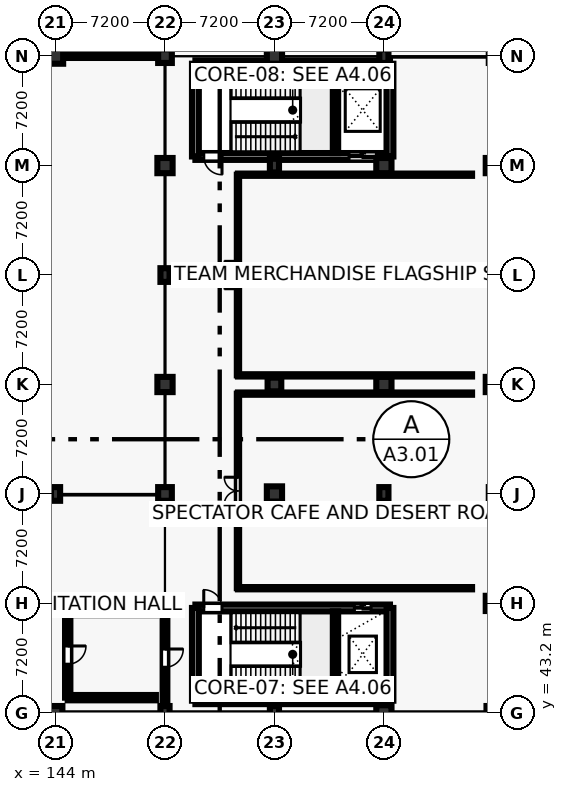
"""IFC4 building model, lengths in metres.
Left out: names, types, materials, properties, quantities, classifications, styles, units other than length and angle.
Written with IfcOpenShell. Run it as: python <this file> out.ifc"""

import sys

from ifc_helpers import new_model, si_unit, direction, frame, frame_2d, origin, origin_2d, place, context, subcontext, project, spatial, rectangle, circle, extrude, element, fill, save


model = new_model("IFC4")
c1 = context("Model", 3, precision=1e-05, world=origin(), true_north=direction((0.0, 1.0)))
c2 = subcontext(c1, "Body", "Model", "MODEL_VIEW")
j1 = project(units=[si_unit("LENGTHUNIT", "METRE"), si_unit("PLANEANGLEUNIT", "RADIAN")], contexts=[c1])
p1 = place(None, origin())
s1 = spatial("IfcSite", under=j1, at=p1, CompositionType="ELEMENT")
p2 = place(p1, origin())
s2 = spatial("IfcBuilding", under=s1, at=p2, CompositionType="ELEMENT")
p3 = place(p2, origin())
s3 = spatial("IfcBuildingStorey", under=s2, at=p3, CompositionType="ELEMENT", Elevation=0.0)
p4 = place(p3, frame((144.0, 43.2, 0.0), z_axis=(0.0, 0.0, 1.0), x_axis=(1.0, 0.0, 0.0)))
e1 = element("IfcColumn", 1, at=p4, inside=s3, PredefinedType="COLUMN", context=c2, shape_type="SweptSolid", body=[
    extrude(rectangle(XDim=0.9, YDim=0.9, at=origin_2d()), origin(), (0.0, 0.0, 1.0), 5.4),
])
p5 = place(p3, frame((144.0, 50.4, 0.0), z_axis=(0.0, 0.0, 1.0), x_axis=(1.0, 0.0, 0.0)))
e2 = element("IfcColumn", 2, at=p5, inside=s3, PredefinedType="COLUMN", context=c2, shape_type="SweptSolid", body=[
    extrude(circle(Radius=0.5, at=origin_2d()), origin(), (0.0, 0.0, 1.0), 5.4),
])
p6 = place(p3, frame((144.0, 57.6, 0.0), z_axis=(0.0, 0.0, 1.0), x_axis=(1.0, 0.0, 0.0)))
e3 = element("IfcColumn", 3, at=p6, inside=s3, PredefinedType="COLUMN", context=c2, shape_type="SweptSolid", body=[
    extrude(rectangle(XDim=0.6, YDim=0.9, at=origin_2d()), origin(), (0.0, 0.0, 1.0), 5.4),
])
p7 = place(p3, frame((144.0, 86.4, 0.0), z_axis=(0.0, 0.0, 1.0), x_axis=(1.0, 0.0, 0.0)))
e4 = element("IfcColumn", 4, at=p7, inside=s3, PredefinedType="COLUMN", context=c2, shape_type="SweptSolid", body=[
    extrude(rectangle(XDim=1.0, YDim=1.0, at=origin_2d()), origin(), (0.0, 0.0, 1.0), 5.4),
])
p8 = place(p3, frame((151.2, 43.2, 0.0), z_axis=(0.0, 0.0, 1.0), x_axis=(1.0, 0.0, 0.0)))
e5 = element("IfcColumn", 5, at=p8, inside=s3, PredefinedType="COLUMN", context=c2, shape_type="SweptSolid", body=[
    extrude(rectangle(XDim=0.6, YDim=0.9, at=origin_2d()), origin(), (0.0, 0.0, 1.0), 5.4),
])
p9 = place(p3, frame((151.2, 50.4, 0.0), z_axis=(0.0, 0.0, 1.0), x_axis=(1.0, 0.0, 0.0)))
e6 = element("IfcColumn", 6, at=p9, inside=s3, PredefinedType="COLUMN", context=c2, shape_type="SweptSolid", body=[
    extrude(rectangle(XDim=1.0, YDim=1.0, at=origin_2d()), origin(), (0.0, 0.0, 1.0), 5.4),
])
p10 = place(p3, frame((151.2, 57.6, 0.0), z_axis=(0.0, 0.0, 1.0), x_axis=(1.0, 0.0, 0.0)))
e7 = element("IfcColumn", 7, at=p10, inside=s3, PredefinedType="COLUMN", context=c2, shape_type="SweptSolid", body=[
    extrude(rectangle(XDim=0.9, YDim=0.9, at=origin_2d()), origin(), (0.0, 0.0, 1.0), 5.4),
])
p11 = place(p3, frame((151.2, 64.8, 0.0), z_axis=(0.0, 0.0, 1.0), x_axis=(1.0, 0.0, 0.0)))
e8 = element("IfcColumn", 8, at=p11, inside=s3, PredefinedType="COLUMN", context=c2, shape_type="SweptSolid", body=[
    extrude(circle(Radius=0.5, at=origin_2d()), origin(), (0.0, 0.0, 1.0), 5.4),
])
p12 = place(p3, frame((151.2, 72.0, 0.0), z_axis=(0.0, 0.0, 1.0), x_axis=(1.0, 0.0, 0.0)))
e9 = element("IfcColumn", 9, at=p12, inside=s3, PredefinedType="COLUMN", context=c2, shape_type="SweptSolid", body=[
    extrude(rectangle(XDim=0.6, YDim=0.9, at=origin_2d()), origin(), (0.0, 0.0, 1.0), 5.4),
])
p13 = place(p3, frame((151.2, 79.2, 0.0), z_axis=(0.0, 0.0, 1.0), x_axis=(1.0, 0.0, 0.0)))
e10 = element("IfcColumn", 10, at=p13, inside=s3, PredefinedType="COLUMN", context=c2, shape_type="SweptSolid", body=[
    extrude(rectangle(XDim=1.0, YDim=1.0, at=origin_2d()), origin(), (0.0, 0.0, 1.0), 5.4),
])
p14 = place(p3, frame((151.2, 86.4, 0.0), z_axis=(0.0, 0.0, 1.0), x_axis=(1.0, 0.0, 0.0)))
e11 = element("IfcColumn", 11, at=p14, inside=s3, PredefinedType="COLUMN", context=c2, shape_type="SweptSolid", body=[
    extrude(rectangle(XDim=0.9, YDim=0.9, at=origin_2d()), origin(), (0.0, 0.0, 1.0), 5.4),
])
p15 = place(p3, frame((158.4, 43.2, 0.0), z_axis=(0.0, 0.0, 1.0), x_axis=(1.0, 0.0, 0.0)))
e12 = element("IfcColumn", 12, at=p15, inside=s3, PredefinedType="COLUMN", context=c2, shape_type="SweptSolid", body=[
    extrude(rectangle(XDim=0.6, YDim=0.9, at=origin_2d()), origin(), (0.0, 0.0, 1.0), 5.4),
])
p16 = place(p3, frame((158.4, 57.6, 0.0), z_axis=(0.0, 0.0, 1.0), x_axis=(1.0, 0.0, 0.0)))
e13 = element("IfcColumn", 13, at=p16, inside=s3, PredefinedType="COLUMN", context=c2, shape_type="SweptSolid", body=[
    extrude(rectangle(XDim=1.0, YDim=1.0, at=origin_2d()), origin(), (0.0, 0.0, 1.0), 5.4),
])
p17 = place(p3, frame((158.4, 64.8, 0.0), z_axis=(0.0, 0.0, 1.0), x_axis=(1.0, 0.0, 0.0)))
e14 = element("IfcColumn", 14, at=p17, inside=s3, PredefinedType="COLUMN", context=c2, shape_type="SweptSolid", body=[
    extrude(rectangle(XDim=0.9, YDim=0.9, at=origin_2d()), origin(), (0.0, 0.0, 1.0), 5.4),
])
p18 = place(p3, frame((158.4, 72.0, 0.0), z_axis=(0.0, 0.0, 1.0), x_axis=(1.0, 0.0, 0.0)))
e15 = element("IfcColumn", 15, at=p18, inside=s3, PredefinedType="COLUMN", context=c2, shape_type="SweptSolid", body=[
    extrude(circle(Radius=0.5, at=origin_2d()), origin(), (0.0, 0.0, 1.0), 5.4),
])
p19 = place(p3, frame((158.4, 79.2, 0.0), z_axis=(0.0, 0.0, 1.0), x_axis=(1.0, 0.0, 0.0)))
e16 = element("IfcColumn", 16, at=p19, inside=s3, PredefinedType="COLUMN", context=c2, shape_type="SweptSolid", body=[
    extrude(rectangle(XDim=0.6, YDim=0.9, at=origin_2d()), origin(), (0.0, 0.0, 1.0), 5.4),
])
p20 = place(p3, frame((158.4, 86.4, 0.0), z_axis=(0.0, 0.0, 1.0), x_axis=(1.0, 0.0, 0.0)))
e17 = element("IfcColumn", 17, at=p20, inside=s3, PredefinedType="COLUMN", context=c2, shape_type="SweptSolid", body=[
    extrude(rectangle(XDim=1.0, YDim=1.0, at=origin_2d()), origin(), (0.0, 0.0, 1.0), 5.4),
])
p21 = place(p3, frame((165.6, 43.2, 0.0), z_axis=(0.0, 0.0, 1.0), x_axis=(1.0, 0.0, 0.0)))
e18 = element("IfcColumn", 18, at=p21, inside=s3, PredefinedType="COLUMN", context=c2, shape_type="SweptSolid", body=[
    extrude(circle(Radius=0.5, at=origin_2d()), origin(), (0.0, 0.0, 1.0), 5.4),
])
p22 = place(p3, frame((165.6, 57.6, 0.0), z_axis=(0.0, 0.0, 1.0), x_axis=(1.0, 0.0, 0.0)))
e19 = element("IfcColumn", 19, at=p22, inside=s3, PredefinedType="COLUMN", context=c2, shape_type="SweptSolid", body=[
    extrude(rectangle(XDim=0.6, YDim=0.9, at=origin_2d()), origin(), (0.0, 0.0, 1.0), 5.4),
])
p23 = place(p3, frame((165.6, 64.8, 0.0), z_axis=(0.0, 0.0, 1.0), x_axis=(1.0, 0.0, 0.0)))
e20 = element("IfcColumn", 20, at=p23, inside=s3, PredefinedType="COLUMN", context=c2, shape_type="SweptSolid", body=[
    extrude(rectangle(XDim=1.0, YDim=1.0, at=origin_2d()), origin(), (0.0, 0.0, 1.0), 5.4),
])
p24 = place(p3, frame((165.6, 72.0, 0.0), z_axis=(0.0, 0.0, 1.0), x_axis=(1.0, 0.0, 0.0)))
e21 = element("IfcColumn", 21, at=p24, inside=s3, PredefinedType="COLUMN", context=c2, shape_type="SweptSolid", body=[
    extrude(rectangle(XDim=0.9, YDim=0.9, at=origin_2d()), origin(), (0.0, 0.0, 1.0), 5.4),
])
p25 = place(p3, frame((165.6, 79.2, 0.0), z_axis=(0.0, 0.0, 1.0), x_axis=(1.0, 0.0, 0.0)))
e22 = element("IfcColumn", 22, at=p25, inside=s3, PredefinedType="COLUMN", context=c2, shape_type="SweptSolid", body=[
    extrude(circle(Radius=0.5, at=origin_2d()), origin(), (0.0, 0.0, 1.0), 5.4),
])
p26 = place(p3, frame((165.6, 86.4, 0.0), z_axis=(0.0, 0.0, 1.0), x_axis=(1.0, 0.0, 0.0)))
e23 = element("IfcColumn", 23, at=p26, inside=s3, PredefinedType="COLUMN", context=c2, shape_type="SweptSolid", body=[
    extrude(rectangle(XDim=0.6, YDim=0.9, at=origin_2d()), origin(), (0.0, 0.0, 1.0), 5.4),
])
p27 = place(p3, frame((172.8, 43.2, 0.0), z_axis=(0.0, 0.0, 1.0), x_axis=(1.0, 0.0, 0.0)))
e24 = element("IfcColumn", 24, at=p27, inside=s3, PredefinedType="COLUMN", context=c2, shape_type="SweptSolid", body=[
    extrude(rectangle(XDim=0.9, YDim=0.9, at=origin_2d()), origin(), (0.0, 0.0, 1.0), 5.4),
])
p28 = place(p3, frame((172.8, 50.4, 0.0), z_axis=(0.0, 0.0, 1.0), x_axis=(1.0, 0.0, 0.0)))
e25 = element("IfcColumn", 25, at=p28, inside=s3, PredefinedType="COLUMN", context=c2, shape_type="SweptSolid", body=[
    extrude(circle(Radius=0.5, at=origin_2d()), origin(), (0.0, 0.0, 1.0), 5.4),
])
p29 = place(p3, frame((172.8, 64.8, 0.0), z_axis=(0.0, 0.0, 1.0), x_axis=(1.0, 0.0, 0.0)))
e26 = element("IfcColumn", 26, at=p29, inside=s3, PredefinedType="COLUMN", context=c2, shape_type="SweptSolid", body=[
    extrude(rectangle(XDim=1.0, YDim=1.0, at=origin_2d()), origin(), (0.0, 0.0, 1.0), 5.4),
])
p30 = place(p3, frame((172.8, 72.0, 0.0), z_axis=(0.0, 0.0, 1.0), x_axis=(1.0, 0.0, 0.0)))
e27 = element("IfcColumn", 27, at=p30, inside=s3, PredefinedType="COLUMN", context=c2, shape_type="SweptSolid", body=[
    extrude(rectangle(XDim=0.9, YDim=0.9, at=origin_2d()), origin(), (0.0, 0.0, 1.0), 5.4),
])
p31 = place(p3, frame((172.8, 79.2, 0.0), z_axis=(0.0, 0.0, 1.0), x_axis=(1.0, 0.0, 0.0)))
e28 = element("IfcColumn", 28, at=p31, inside=s3, PredefinedType="COLUMN", context=c2, shape_type="SweptSolid", body=[
    extrude(circle(Radius=0.5, at=origin_2d()), origin(), (0.0, 0.0, 1.0), 5.4),
])
p32 = place(p3, frame((153.2, 44.0, 0.0), z_axis=(0.0, 0.0, 1.0), x_axis=(1.0, 0.0, 0.0)))
e29 = element("IfcWall", 29, at=p32, inside=s3, PredefinedType="SHEAR", context=c2, shape_type="SweptSolid", body=[
    extrude(rectangle(XDim=12.8, YDim=0.45, at=frame_2d((6.4, 0.0))), origin(), (0.0, 0.0, 1.0), 5.06),
])
p33 = place(p3, frame((153.2, 50.1, 0.0), z_axis=(0.0, 0.0, 1.0), x_axis=(1.0, 0.0, 0.0)))
e30 = element("IfcWall", 30, at=p33, inside=s3, PredefinedType="SHEAR", context=c2, shape_type="SweptSolid", body=[
    extrude(rectangle(XDim=12.8, YDim=0.45, at=frame_2d((6.4, 0.0))), origin(), (0.0, 0.0, 1.0), 5.06),
])
p34 = place(p33, frame((0.55, 0.0, 0.0)))
e31 = element("IfcOpeningElement", 31, at=p34, cuts=e30, PredefinedType="OPENING", context=c2, shape_type="SweptSolid", body=[
    extrude(rectangle(XDim=1.2, YDim=2.25, at=frame_2d((0.6, 1.125))), frame((0.0, 0.235, 0.0), z_axis=(0.0, -1.0, 0.0), x_axis=(1.0, 0.0, 0.0)), (0.0, 0.0, 1.0), 0.47),
])
p35 = place(p33, frame((10.458, 0.0, 0.0)))
e32 = element("IfcOpeningElement", 32, at=p35, cuts=e30, PredefinedType="OPENING", context=c2, shape_type="SweptSolid", body=[
    extrude(rectangle(XDim=1.1, YDim=2.2, at=frame_2d((0.55, 1.1))), frame((0.0, 0.235, 0.0), z_axis=(0.0, -1.0, 0.0), x_axis=(1.0, 0.0, 0.0)), (0.0, 0.0, 1.0), 0.47),
])
for number, where, z_axis, x_axis in (
    (33, (153.2, 44.0, 0.0), (0.0, 0.0, 1.0), (0.0, 1.0, 0.0)),
    (34, (166.0, 44.0, 0.0), (0.0, 0.0, 1.0), (0.0, 1.0, 0.0)),
):
    element("IfcWall", number, at=place(p3, frame(where, z_axis=z_axis, x_axis=x_axis)), inside=s3, PredefinedType="SHEAR", context=c2, shape_type="SweptSolid", body=[
        extrude(rectangle(XDim=6.1, YDim=0.45, at=frame_2d((3.05, 0.0))), origin(), (0.0, 0.0, 1.0), 5.06),
    ])
p36 = place(p3, frame((162.416, 44.225, 0.0), z_axis=(0.0, 0.0, 1.0), x_axis=(0.0, 1.0, 0.0)))
e35 = element("IfcWall", 35, at=p36, inside=s3, PredefinedType="SHEAR", context=c2, shape_type="SweptSolid", body=[
    extrude(rectangle(XDim=5.65, YDim=0.35, at=frame_2d((2.825, 0.0))), origin(), (0.0, 0.0, 1.0), 5.06),
])
p37 = place(p3, frame((153.2, 79.8, 0.0), z_axis=(0.0, 0.0, 1.0), x_axis=(1.0, 0.0, 0.0)))
e36 = element("IfcWall", 36, at=p37, inside=s3, PredefinedType="SHEAR", context=c2, shape_type="SweptSolid", body=[
    extrude(rectangle(XDim=12.8, YDim=0.45, at=frame_2d((6.4, 0.0))), origin(), (0.0, 0.0, 1.0), 5.06),
])
p38 = place(p37, frame((0.55, 0.0, 0.0)))
e37 = element("IfcOpeningElement", 37, at=p38, cuts=e36, PredefinedType="OPENING", context=c2, shape_type="SweptSolid", body=[
    extrude(rectangle(XDim=1.2, YDim=2.25, at=frame_2d((0.6, 1.125))), frame((0.0, 0.235, 0.0), z_axis=(0.0, -1.0, 0.0), x_axis=(1.0, 0.0, 0.0)), (0.0, 0.0, 1.0), 0.47),
])
p39 = place(p37, frame((10.108, 0.0, 0.0)))
e38 = element("IfcOpeningElement", 38, at=p39, cuts=e36, PredefinedType="OPENING", context=c2, shape_type="SweptSolid", body=[
    extrude(rectangle(XDim=1.8, YDim=2.4, at=frame_2d((0.9, 1.2))), frame((0.0, 0.235, 0.0), z_axis=(0.0, -1.0, 0.0), x_axis=(1.0, 0.0, 0.0)), (0.0, 0.0, 1.0), 0.47),
])
p40 = place(p3, frame((153.2, 85.9, 0.0), z_axis=(0.0, 0.0, 1.0), x_axis=(1.0, 0.0, 0.0)))
e39 = element("IfcWall", 39, at=p40, inside=s3, PredefinedType="SHEAR", context=c2, shape_type="SweptSolid", body=[
    extrude(rectangle(XDim=12.8, YDim=0.45, at=frame_2d((6.4, 0.0))), origin(), (0.0, 0.0, 1.0), 5.06),
])
for number, where, z_axis, x_axis in (
    (40, (153.2, 79.8, 0.0), (0.0, 0.0, 1.0), (0.0, 1.0, 0.0)),
    (41, (166.0, 79.8, 0.0), (0.0, 0.0, 1.0), (0.0, 1.0, 0.0)),
):
    element("IfcWall", number, at=place(p3, frame(where, z_axis=z_axis, x_axis=x_axis)), inside=s3, PredefinedType="SHEAR", context=c2, shape_type="SweptSolid", body=[
        extrude(rectangle(XDim=6.1, YDim=0.45, at=frame_2d((3.05, 0.0))), origin(), (0.0, 0.0, 1.0), 5.06),
    ])
p41 = place(p3, frame((162.416, 80.025, 0.0), z_axis=(0.0, 0.0, 1.0), x_axis=(0.0, 1.0, 0.0)))
e42 = element("IfcWall", 42, at=p41, inside=s3, PredefinedType="SHEAR", context=c2, shape_type="SweptSolid", body=[
    extrude(rectangle(XDim=5.65, YDim=0.35, at=frame_2d((2.825, 0.0))), origin(), (0.0, 0.0, 1.0), 5.06),
])
p42 = place(p3, frame((151.2, 43.45, 0.0), z_axis=(0.0, 0.0, 1.0), x_axis=(0.0, 1.0, 0.0)))
e43 = element("IfcWall", 43, at=p42, inside=s3, PredefinedType="SOLIDWALL", context=c2, shape_type="SweptSolid", body=[
    extrude(rectangle(XDim=6.7, YDim=0.31, at=frame_2d((3.35, 0.0))), origin(), (0.0, 0.0, 1.0), 4.1),
])
p43 = place(p42, frame((2.75, 0.0, 0.0)))
e44 = element("IfcOpeningElement", 44, at=p43, cuts=e43, PredefinedType="OPENING", context=c2, shape_type="SweptSolid", body=[
    extrude(rectangle(XDim=1.2, YDim=2.25, at=frame_2d((0.6, 1.125))), frame((0.0, 0.165, 0.0), z_axis=(0.0, -1.0, 0.0), x_axis=(1.0, 0.0, 0.0)), (0.0, 0.0, 1.0), 0.33),
])
p44 = place(p3, frame((144.25, 86.4, 0.0), z_axis=(0.0, 0.0, 1.0), x_axis=(1.0, 0.0, 0.0)))
e45 = element("IfcWall", 45, at=p44, inside=s3, PredefinedType="SOLIDWALL", context=c2, shape_type="SweptSolid", body=[
    extrude(rectangle(XDim=6.7, YDim=0.24, at=frame_2d((3.35, 0.0))), origin(), (0.0, 0.0, 1.0), 4.1),
])
p45 = place(p44, frame((2.25, 0.0, 0.9)))
e46 = element("IfcOpeningElement", 46, at=p45, cuts=e45, PredefinedType="OPENING", context=c2, shape_type="SweptSolid", body=[
    extrude(rectangle(XDim=2.2, YDim=1.4, at=frame_2d((1.1, 0.7))), frame((0.0, 0.13, 0.0), z_axis=(0.0, -1.0, 0.0), x_axis=(1.0, 0.0, 0.0)), (0.0, 0.0, 1.0), 0.26),
])
for number, where, z_axis, x_axis in (
    (47, (144.8, 44.2, 0.0), (0.0, 0.0, 1.0), (1.0, 0.0, 0.0)),
    (48, (150.6, 49.8, 0.0), (0.0, 0.0, 1.0), (-1.0, 0.0, 0.0)),
):
    element("IfcWall", number, at=place(p3, frame(where, z_axis=z_axis, x_axis=x_axis)), inside=s3, PredefinedType="SHEAR", context=c2, shape_type="SweptSolid", body=[
        extrude(rectangle(XDim=5.8, YDim=0.35, at=frame_2d((2.9, 0.0))), origin(), (0.0, 0.0, 1.0), 4.1),
    ])
p46 = place(p3, frame((144.8, 49.8, 0.0), z_axis=(0.0, 0.0, 1.0), x_axis=(0.0, -1.0, 0.0)))
e49 = element("IfcWall", 49, at=p46, inside=s3, PredefinedType="SHEAR", context=c2, shape_type="SweptSolid", body=[
    extrude(rectangle(XDim=5.6, YDim=0.35, at=frame_2d((2.8, 0.0))), origin(), (0.0, 0.0, 1.0), 4.1),
])
p47 = place(p46, frame((2.2, 0.0, 0.0)))
e50 = element("IfcOpeningElement", 50, at=p47, cuts=e49, PredefinedType="OPENING", context=c2, shape_type="SweptSolid", body=[
    extrude(rectangle(XDim=1.2, YDim=2.25, at=frame_2d((0.6, 1.125))), frame((0.0, 0.185, 0.0), z_axis=(0.0, -1.0, 0.0), x_axis=(1.0, 0.0, 0.0)), (0.0, 0.0, 1.0), 0.37),
])
for number, where, z_axis, x_axis in (
    (51, (156.0, 51.4, 0.0), (0.0, 0.0, 1.0), (1.0, 0.0, 0.0)),
    (52, (171.4, 64.2, 0.0), (0.0, 0.0, 1.0), (-1.0, 0.0, 0.0)),
):
    element("IfcWall", number, at=place(p3, frame(where, z_axis=z_axis, x_axis=x_axis)), inside=s3, PredefinedType="PARTITIONING", context=c2, shape_type="SweptSolid", body=[
        extrude(rectangle(XDim=15.4, YDim=0.15, at=frame_2d((7.7, 0.0))), origin(), (0.0, 0.0, 1.0), 4.1),
    ])
p48 = place(p3, frame((156.0, 64.2, 0.0), z_axis=(0.0, 0.0, 1.0), x_axis=(0.0, -1.0, 0.0)))
e53 = element("IfcWall", 53, at=p48, inside=s3, PredefinedType="PARTITIONING", context=c2, shape_type="SweptSolid", body=[
    extrude(rectangle(XDim=12.8, YDim=0.15, at=frame_2d((6.4, 0.0))), origin(), (0.0, 0.0, 1.0), 4.1),
])
p49 = place(p48, frame((5.5, 0.0, 0.0)))
e54 = element("IfcOpeningElement", 54, at=p49, cuts=e53, PredefinedType="OPENING", context=c2, shape_type="SweptSolid", body=[
    extrude(rectangle(XDim=1.8, YDim=2.3, at=frame_2d((0.9, 1.15))), frame((0.0, 0.085, 0.0), z_axis=(0.0, -1.0, 0.0), x_axis=(1.0, 0.0, 0.0)), (0.0, 0.0, 1.0), 0.17),
])
for number, where, z_axis, x_axis in (
    (55, (156.0, 65.4, 0.0), (0.0, 0.0, 1.0), (1.0, 0.0, 0.0)),
    (56, (171.4, 78.6, 0.0), (0.0, 0.0, 1.0), (-1.0, 0.0, 0.0)),
):
    element("IfcWall", number, at=place(p3, frame(where, z_axis=z_axis, x_axis=x_axis)), inside=s3, PredefinedType="PARTITIONING", context=c2, shape_type="SweptSolid", body=[
        extrude(rectangle(XDim=15.4, YDim=0.15, at=frame_2d((7.7, 0.0))), origin(), (0.0, 0.0, 1.0), 4.1),
    ])
p50 = place(p3, frame((156.0, 78.6, 0.0), z_axis=(0.0, 0.0, 1.0), x_axis=(0.0, -1.0, 0.0)))
e57 = element("IfcWall", 57, at=p50, inside=s3, PredefinedType="PARTITIONING", context=c2, shape_type="SweptSolid", body=[
    extrude(rectangle(XDim=13.2, YDim=0.15, at=frame_2d((6.6, 0.0))), origin(), (0.0, 0.0, 1.0), 4.1),
])
p51 = place(p50, frame((5.7, 0.0, 0.0)))
e58 = element("IfcOpeningElement", 58, at=p51, cuts=e57, PredefinedType="OPENING", context=c2, shape_type="SweptSolid", body=[
    extrude(rectangle(XDim=1.8, YDim=2.3, at=frame_2d((0.9, 1.15))), frame((0.0, 0.085, 0.0), z_axis=(0.0, -1.0, 0.0), x_axis=(1.0, 0.0, 0.0)), (0.0, 0.0, 1.0), 0.17),
])
p52 = place(p43, frame((1.2, 0.0, 0.0), z_axis=(0.0, 0.0, 1.0), x_axis=(-1.0, 0.0, 0.0)))
e59 = element("IfcDoor", 59, at=p52, inside=s3, OperationType="SINGLE_SWING_RIGHT", PredefinedType="DOOR", context=c2, shape_type="SweptSolid", body=[
    extrude(rectangle(XDim=1.2, YDim=2.25, at=frame_2d((0.6, 1.125))), frame((0.0, 0.025, 0.0), z_axis=(0.0, -1.0, 0.0), x_axis=(1.0, 0.0, 0.0)), (0.0, 0.0, 1.0), 0.05),
])
fill(e44, e59)
p53 = place(p45, origin())
e60 = element("IfcWindow", 60, at=p53, inside=s3, PartitioningType="SINGLE_PANEL", PredefinedType="WINDOW", context=c2, shape_type="SweptSolid", body=[
    extrude(rectangle(XDim=2.2, YDim=1.4, at=frame_2d((1.1, 0.7))), frame((0.0, 0.03, 0.0), z_axis=(0.0, -1.0, 0.0), x_axis=(1.0, 0.0, 0.0)), (0.0, 0.0, 1.0), 0.06),
])
fill(e46, e60)
p54 = place(p34, origin())
e61 = element("IfcDoor", 61, at=p54, inside=s3, OperationType="SINGLE_SWING_LEFT", PredefinedType="DOOR", context=c2, shape_type="SweptSolid", body=[
    extrude(rectangle(XDim=1.2, YDim=2.25, at=frame_2d((0.6, 1.125))), frame((0.0, 0.025, 0.0), z_axis=(0.0, -1.0, 0.0), x_axis=(1.0, 0.0, 0.0)), (0.0, 0.0, 1.0), 0.05),
])
fill(e31, e61)
p55 = place(p35, origin())
e62 = element("IfcDoor", 62, at=p55, inside=s3, OperationType="SLIDING_TO_RIGHT", PredefinedType="DOOR", context=c2, shape_type="SweptSolid", body=[
    extrude(rectangle(XDim=1.1, YDim=2.2, at=frame_2d((0.55, 1.1))), frame((0.0, 0.025, 0.0), z_axis=(0.0, -1.0, 0.0), x_axis=(1.0, 0.0, 0.0)), (0.0, 0.0, 1.0), 0.05),
])
fill(e32, e62)
p56 = place(p38, frame((1.2, 0.0, 0.0), z_axis=(0.0, 0.0, 1.0), x_axis=(-1.0, 0.0, 0.0)))
e63 = element("IfcDoor", 63, at=p56, inside=s3, OperationType="SINGLE_SWING_RIGHT", PredefinedType="DOOR", context=c2, shape_type="SweptSolid", body=[
    extrude(rectangle(XDim=1.2, YDim=2.25, at=frame_2d((0.6, 1.125))), frame((0.0, 0.025, 0.0), z_axis=(0.0, -1.0, 0.0), x_axis=(1.0, 0.0, 0.0)), (0.0, 0.0, 1.0), 0.05),
])
fill(e37, e63)
p57 = place(p39, origin())
e64 = element("IfcDoor", 64, at=p57, inside=s3, OperationType="SLIDING_TO_RIGHT", PredefinedType="DOOR", context=c2, shape_type="SweptSolid", body=[
    extrude(rectangle(XDim=1.8, YDim=2.4, at=frame_2d((0.9, 1.2))), frame((0.0, 0.025, 0.0), z_axis=(0.0, -1.0, 0.0), x_axis=(1.0, 0.0, 0.0)), (0.0, 0.0, 1.0), 0.05),
])
fill(e38, e64)
p58 = place(p47, origin())
e65 = element("IfcDoor", 65, at=p58, inside=s3, OperationType="SINGLE_SWING_LEFT", PredefinedType="DOOR", context=c2, shape_type="SweptSolid", body=[
    extrude(rectangle(XDim=1.2, YDim=2.25, at=frame_2d((0.6, 1.125))), frame((0.0, 0.025, 0.0), z_axis=(0.0, -1.0, 0.0), x_axis=(1.0, 0.0, 0.0)), (0.0, 0.0, 1.0), 0.05),
])
fill(e50, e65)
p59 = place(p49, frame((1.8, 0.0, 0.0), z_axis=(0.0, 0.0, 1.0), x_axis=(-1.0, 0.0, 0.0)))
e66 = element("IfcDoor", 66, at=p59, inside=s3, OperationType="DOUBLE_DOOR_SINGLE_SWING", PredefinedType="DOOR", context=c2, shape_type="SweptSolid", body=[
    extrude(rectangle(XDim=1.8, YDim=2.3, at=frame_2d((0.9, 1.15))), frame((0.0, 0.025, 0.0), z_axis=(0.0, -1.0, 0.0), x_axis=(1.0, 0.0, 0.0)), (0.0, 0.0, 1.0), 0.05),
])
fill(e54, e66)
p60 = place(p51, frame((1.8, 0.0, 0.0), z_axis=(0.0, 0.0, 1.0), x_axis=(-1.0, 0.0, 0.0)))
e67 = element("IfcDoor", 67, at=p60, inside=s3, OperationType="DOUBLE_DOOR_SINGLE_SWING", PredefinedType="DOOR", context=c2, shape_type="SweptSolid", body=[
    extrude(rectangle(XDim=1.8, YDim=2.3, at=frame_2d((0.9, 1.15))), frame((0.0, 0.025, 0.0), z_axis=(0.0, -1.0, 0.0), x_axis=(1.0, 0.0, 0.0)), (0.0, 0.0, 1.0), 0.05),
])
fill(e58, e67)
save(model, sys.argv[1])
